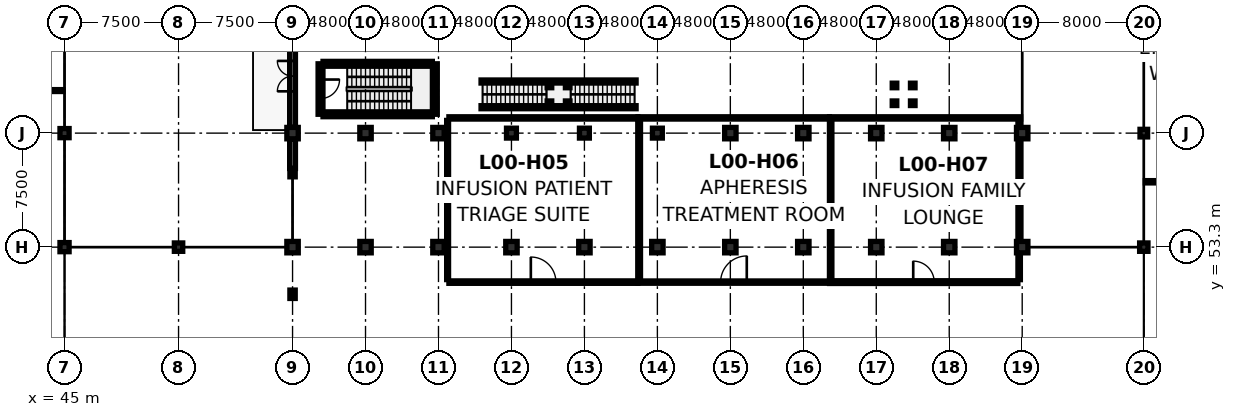
"""IFC4 building model, lengths in metres.
Left out: names, types, materials, properties, quantities, classifications, styles, units other than length and angle.
Written with IfcOpenShell. Run it as: python <this file> out.ifc"""

import sys

from ifc_helpers import new_model, si_unit, direction, frame, frame_2d, origin, origin_2d, place, context, subcontext, project, spatial, rectangle, circle, i_section, extrude, element, fill, save


model = new_model("IFC4")
c1 = context("Model", 3, precision=1e-05, world=origin(), true_north=direction((0.0, 1.0)))
c2 = subcontext(c1, "Body", "Model", "MODEL_VIEW")
j1 = project(units=[si_unit("LENGTHUNIT", "METRE"), si_unit("PLANEANGLEUNIT", "RADIAN")], contexts=[c1])
p1 = place(None, origin())
s1 = spatial("IfcSite", under=j1, at=p1, CompositionType="ELEMENT")
p2 = place(p1, origin())
s2 = spatial("IfcBuilding", under=s1, at=p2, CompositionType="ELEMENT")
p3 = place(p2, origin())
s3 = spatial("IfcBuildingStorey", under=s2, at=p3, CompositionType="ELEMENT", Elevation=0.0)
for number, where, z_axis, x_axis in (
    (1, (45.0, 53.3, 0.0), (0.0, 0.0, 1.0), (1.0, 0.0, 0.0)),
    (2, (45.0, 60.8, 0.0), (0.0, 0.0, 1.0), (1.0, 0.0, 0.0)),
):
    element("IfcColumn", number, at=place(p3, frame(where, z_axis=z_axis, x_axis=x_axis)), inside=s3, PredefinedType="COLUMN", context=c2, shape_type="SweptSolid", body=[
        extrude(rectangle(XDim=0.6, YDim=0.6, at=origin_2d()), origin(), (0.0, 0.0, 1.0), 4.7),
    ])
p4 = place(p3, frame((52.5, 53.3, 0.0), z_axis=(0.0, 0.0, 1.0), x_axis=(1.0, 0.0, 0.0)))
e3 = element("IfcColumn", 3, at=p4, inside=s3, PredefinedType="COLUMN", context=c2, shape_type="SweptSolid", body=[
    extrude(rectangle(XDim=0.55, YDim=0.55, at=origin_2d()), origin(), (0.0, 0.0, 1.0), 4.7),
])
for number, where, z_axis, x_axis in (
    (4, (60.0, 53.3, 0.0), (0.0, 0.0, 1.0), (1.0, 0.0, 0.0)),
    (5, (60.0, 60.8, 0.0), (0.0, 0.0, 1.0), (1.0, 0.0, 0.0)),
    (6, (64.8, 53.3, 0.0), (0.0, 0.0, 1.0), (1.0, 0.0, 0.0)),
    (7, (64.8, 60.8, 0.0), (0.0, 0.0, 1.0), (1.0, 0.0, 0.0)),
    (8, (69.6, 53.3, 0.0), (0.0, 0.0, 1.0), (1.0, 0.0, 0.0)),
    (9, (69.6, 60.8, 0.0), (0.0, 0.0, 1.0), (1.0, 0.0, 0.0)),
    (10, (74.4, 53.3, 0.0), (0.0, 0.0, 1.0), (1.0, 0.0, 0.0)),
    (11, (79.2, 53.3, 0.0), (0.0, 0.0, 1.0), (1.0, 0.0, 0.0)),
    (12, (84.0, 53.3, 0.0), (0.0, 0.0, 1.0), (1.0, 0.0, 0.0)),
    (13, (88.8, 53.3, 0.0), (0.0, 0.0, 1.0), (1.0, 0.0, 0.0)),
    (14, (88.8, 60.8, 0.0), (0.0, 0.0, 1.0), (1.0, 0.0, 0.0)),
    (15, (93.6, 53.3, 0.0), (0.0, 0.0, 1.0), (1.0, 0.0, 0.0)),
    (16, (93.6, 60.8, 0.0), (0.0, 0.0, 1.0), (1.0, 0.0, 0.0)),
    (17, (98.4, 53.3, 0.0), (0.0, 0.0, 1.0), (1.0, 0.0, 0.0)),
    (18, (98.4, 60.8, 0.0), (0.0, 0.0, 1.0), (1.0, 0.0, 0.0)),
    (19, (103.2, 53.3, 0.0), (0.0, 0.0, 1.0), (1.0, 0.0, 0.0)),
    (20, (103.2, 60.8, 0.0), (0.0, 0.0, 1.0), (1.0, 0.0, 0.0)),
    (21, (108.0, 53.3, 0.0), (0.0, 0.0, 1.0), (1.0, 0.0, 0.0)),
    (22, (108.0, 60.8, 0.0), (0.0, 0.0, 1.0), (1.0, 0.0, 0.0)),
):
    element("IfcColumn", number, at=place(p3, frame(where, z_axis=z_axis, x_axis=x_axis)), inside=s3, PredefinedType="COLUMN", context=c2, shape_type="SweptSolid", body=[
        extrude(circle(Radius=0.375, at=origin_2d()), origin(), (0.0, 0.0, 1.0), 4.7),
    ])
p5 = place(p3, frame((116.0, 53.3, 0.0), z_axis=(0.0, 0.0, 1.0), x_axis=(1.0, 0.0, 0.0)))
e23 = element("IfcColumn", 23, at=p5, inside=s3, PredefinedType="COLUMN", context=c2, shape_type="SweptSolid", body=[
    extrude(rectangle(XDim=0.55, YDim=0.55, at=origin_2d()), origin(), (0.0, 0.0, 1.0), 4.7),
])
p6 = place(p3, frame((116.0, 60.8, 0.0), z_axis=(0.0, 0.0, 1.0), x_axis=(1.0, 0.0, 0.0)))
e24 = element("IfcColumn", 24, at=p6, inside=s3, PredefinedType="COLUMN", context=c2, shape_type="SweptSolid", body=[
    extrude(rectangle(XDim=0.5, YDim=0.5, at=origin_2d()), origin(), (0.0, 0.0, 1.0), 4.704),
])
for number, where, z_axis, x_axis in (
    (25, (60.0, 50.2, 0.0), (0.0, 0.0, 1.0), (1.0, 0.0, 0.0)),
    (26, (60.0, 58.2, 0.0), (0.0, 0.0, 1.0), (1.0, 0.0, 0.0)),
):
    element("IfcColumn", number, at=place(p3, frame(where, z_axis=z_axis, x_axis=x_axis)), inside=s3, PredefinedType="PILASTER", context=c2, shape_type="SweptSolid", body=[
        extrude(rectangle(XDim=0.35, YDim=0.55, at=origin_2d()), origin(), (0.0, 0.0, 1.0), 4.7),
    ])
for number, where, z_axis, x_axis in (
    (27, (74.4, 60.8, 0.0), (0.0, 0.0, 1.0), (1.0, 0.0, 0.0)),
    (28, (79.2, 60.8, 0.0), (0.0, 0.0, 1.0), (1.0, 0.0, 0.0)),
    (29, (84.0, 60.8, 0.0), (0.0, 0.0, 1.0), (1.0, 0.0, 0.0)),
):
    element("IfcColumn", number, at=place(p3, frame(where, z_axis=z_axis, x_axis=x_axis)), inside=s3, PredefinedType="COLUMN", context=c2, shape_type="SweptSolid", body=[
        extrude(circle(Radius=0.325, at=origin_2d()), origin(), (0.0, 0.0, 1.0), 4.7),
    ])
p7 = place(p3, frame((60.0, 58.475, 0.0), z_axis=(0.0, 0.0, 1.0), x_axis=(0.0, 1.0, 0.0)))
e30 = element("IfcWall", 30, at=p7, inside=s3, PredefinedType="SOLIDWALL", context=c2, shape_type="SweptSolid", body=[
    extrude(rectangle(XDim=1.95, YDim=0.38, at=frame_2d((0.975, 0.0))), origin(), (0.0, 0.0, 1.0), 4.035),
])
p8 = place(p3, frame((60.0, 61.175, 0.0), z_axis=(0.0, 0.0, 1.0), x_axis=(0.0, 1.0, 0.0)))
e31 = element("IfcWall", 31, at=p8, inside=s3, PredefinedType="SOLIDWALL", context=c2, shape_type="SweptSolid", body=[
    extrude(rectangle(XDim=6.75, YDim=0.38, at=frame_2d((3.375, 0.0))), origin(), (0.0, 0.0, 1.0), 4.035),
])
p9 = place(p8, frame((2.375, 0.0, 0.0)))
e32 = element("IfcOpeningElement", 32, at=p9, cuts=e31, PredefinedType="OPENING", context=c2, shape_type="SweptSolid", body=[
    extrude(rectangle(XDim=2.0, YDim=2.35, at=frame_2d((1.0, 1.175))), frame((0.0, 0.202, 0.0), z_axis=(0.0, -1.0, 0.0), x_axis=(1.0, 0.0, 0.0)), (0.0, 0.0, 1.0), 0.404),
])
p10 = place(p3, frame((62.005, 62.04, 0.0), z_axis=(0.0, 0.0, 1.0), x_axis=(1.0, 0.0, 0.0)))
e33 = element("IfcWall", 33, at=p10, inside=s3, PredefinedType="SHEAR", context=c2, shape_type="SweptSolid", body=[
    extrude(rectangle(XDim=7.19, YDim=0.32, at=frame_2d((3.595, 0.0))), origin(), (0.0, 0.0, 1.0), 4.7),
])
p11 = place(p3, frame((69.36, 62.04, 0.0), z_axis=(0.0, 0.0, 1.0), x_axis=(0.0, 1.0, 0.0)))
e34 = element("IfcWall", 34, at=p11, inside=s3, PredefinedType="SHEAR", context=c2, shape_type="SweptSolid", body=[
    extrude(rectangle(XDim=3.32, YDim=0.32, at=frame_2d((1.66, 0.0))), origin(), (0.0, 0.0, 1.0), 4.7),
])
p12 = place(p3, frame((69.195, 65.36, 0.0), z_axis=(0.0, 0.0, 1.0), x_axis=(-1.0, 0.0, 0.0)))
e35 = element("IfcWall", 35, at=p12, inside=s3, PredefinedType="SHEAR", context=c2, shape_type="SweptSolid", body=[
    extrude(rectangle(XDim=7.19, YDim=0.32, at=frame_2d((3.595, 0.0))), origin(), (0.0, 0.0, 1.0), 4.7),
])
p13 = place(p3, frame((61.84, 65.36, 0.0), z_axis=(0.0, 0.0, 1.0), x_axis=(0.0, -1.0, 0.0)))
e36 = element("IfcWall", 36, at=p13, inside=s3, PredefinedType="SHEAR", context=c2, shape_type="SweptSolid", body=[
    extrude(rectangle(XDim=3.32, YDim=0.32, at=frame_2d((1.66, 0.0))), origin(), (0.0, 0.0, 1.0), 4.7),
])
p14 = place(p13, frame((1.035, 0.0, 0.0)))
e37 = element("IfcOpeningElement", 37, at=p14, cuts=e36, PredefinedType="OPENING", context=c2, shape_type="SweptSolid", body=[
    extrude(rectangle(XDim=1.25, YDim=2.2, at=frame_2d((0.625, 1.1))), frame((0.0, 0.172, 0.0), z_axis=(0.0, -1.0, 0.0), x_axis=(1.0, 0.0, 0.0)), (0.0, 0.0, 1.0), 0.344),
])
for number, where, z_axis, x_axis in (
    (38, (72.4, 62.505, 0.0), (0.0, 0.0, 1.0), (1.0, 0.0, 0.0)),
    (39, (72.4, 64.195, 0.0), (0.0, 0.0, 1.0), (1.0, 0.0, 0.0)),
):
    element("IfcWall", number, at=place(p3, frame(where, z_axis=z_axis, x_axis=x_axis)), inside=s3, PredefinedType="PARTITIONING", context=c2, shape_type="SweptSolid", body=[
        extrude(rectangle(XDim=10.2, YDim=0.2, at=frame_2d((5.1, 0.0))), origin(), (0.0, 0.0, 1.0), 2.3),
    ])
for number, where, z_axis, x_axis in (
    (40, (76.9, 62.765, 0.0), (0.0, 0.0, 1.0), (1.0, 0.0, 0.0)),
    (41, (78.1, 62.765, 0.0), (0.0, 0.0, 1.0), (1.0, 0.0, 0.0)),
    (42, (78.1, 63.935, 0.0), (0.0, 0.0, 1.0), (1.0, 0.0, 0.0)),
    (43, (76.9, 63.935, 0.0), (0.0, 0.0, 1.0), (1.0, 0.0, 0.0)),
):
    element("IfcColumn", number, at=place(p3, frame(where, z_axis=z_axis, x_axis=x_axis)), inside=s3, PredefinedType="COLUMN", context=c2, shape_type="SweptSolid", body=[
        extrude(i_section(OverallWidth=0.3, OverallDepth=0.3, WebThickness=0.011, FlangeThickness=0.019, FilletRadius=0.027, at=origin_2d()), origin(), (0.0, 0.0, 1.0), 2.3),
    ])
for number, where, z_axis, x_axis in (
    (44, (99.6, 62.765, 0.0), (0.0, 0.0, 1.0), (1.0, 0.0, 0.0)),
    (45, (100.8, 62.765, 0.0), (0.0, 0.0, 1.0), (1.0, 0.0, 0.0)),
    (46, (100.8, 63.935, 0.0), (0.0, 0.0, 1.0), (1.0, 0.0, 0.0)),
    (47, (99.6, 63.935, 0.0), (0.0, 0.0, 1.0), (1.0, 0.0, 0.0)),
):
    element("IfcColumn", number, at=place(p3, frame(where, z_axis=z_axis, x_axis=x_axis)), inside=s3, PredefinedType="COLUMN", context=c2, shape_type="SweptSolid", body=[
        extrude(i_section(OverallWidth=0.3, OverallDepth=0.3, WebThickness=0.011, FlangeThickness=0.019, FilletRadius=0.027, at=origin_2d()), origin(), (0.0, 0.0, 1.0), 4.7),
    ])
p15 = place(p3, frame((29.927, 63.6, 0.0), z_axis=(0.0, 0.0, 1.0), x_axis=(1.0, 0.0, 0.0)))
e48 = element("IfcWall", 48, at=p15, inside=s3, PredefinedType="PARTITIONING", context=c2, shape_type="SweptSolid", body=[
    extrude(rectangle(XDim=14.971, YDim=0.125, at=frame_2d((7.485, 0.0))), origin(), (0.0, 0.0, 1.0), 3.985),
])
p16 = place(p15, frame((6.926, 0.0, 0.0)))
e49 = element("IfcOpeningElement", 49, at=p16, cuts=e48, PredefinedType="OPENING", context=c2, shape_type="SweptSolid", body=[
    extrude(rectangle(XDim=1.12, YDim=2.2, at=frame_2d((0.56, 1.1))), frame((0.0, 0.074, 0.0), z_axis=(0.0, -1.0, 0.0), x_axis=(1.0, 0.0, 0.0)), (0.0, 0.0, 1.0), 0.149),
])
p17 = place(p3, frame((70.285, 51.0, 0.0), z_axis=(0.0, 0.0, 1.0), x_axis=(1.0, 0.0, 0.0)))
e50 = element("IfcWall", 50, at=p17, inside=s3, PredefinedType="PARTITIONING", context=c2, shape_type="SweptSolid", body=[
    extrude(rectangle(XDim=12.43, YDim=0.16, at=frame_2d((6.215, 0.0))), origin(), (0.0, 0.0, 1.0), 3.985),
])
p18 = place(p17, frame((5.39, 0.0, 0.0)))
e51 = element("IfcOpeningElement", 51, at=p18, cuts=e50, PredefinedType="OPENING", context=c2, shape_type="SweptSolid", body=[
    extrude(rectangle(XDim=1.65, YDim=2.32, at=frame_2d((0.825, 1.16))), frame((0.0, 0.092, 0.0), z_axis=(0.0, -1.0, 0.0), x_axis=(1.0, 0.0, 0.0)), (0.0, 0.0, 1.0), 0.184),
])
p19 = place(p3, frame((82.727, 51.0, 0.0), z_axis=(0.0, 0.0, 1.0), x_axis=(1.0, 0.0, 0.0)))
e52 = element("IfcWall", 52, at=p19, inside=s3, PredefinedType="PARTITIONING", context=c2, shape_type="SweptSolid", body=[
    extrude(rectangle(XDim=12.588, YDim=0.15, at=frame_2d((6.294, 0.0))), origin(), (0.0, 0.0, 1.0), 3.985),
])
p20 = place(p19, frame((5.434, 0.0, 0.0)))
e53 = element("IfcOpeningElement", 53, at=p20, cuts=e52, PredefinedType="OPENING", context=c2, shape_type="SweptSolid", body=[
    extrude(rectangle(XDim=1.72, YDim=2.34, at=frame_2d((0.86, 1.17))), frame((0.0, 0.087, 0.0), z_axis=(0.0, -1.0, 0.0), x_axis=(1.0, 0.0, 0.0)), (0.0, 0.0, 1.0), 0.174),
])
p21 = place(p3, frame((95.327, 51.0, 0.0), z_axis=(0.0, 0.0, 1.0), x_axis=(1.0, 0.0, 0.0)))
e54 = element("IfcWall", 54, at=p21, inside=s3, PredefinedType="PARTITIONING", context=c2, shape_type="SweptSolid", body=[
    extrude(rectangle(XDim=12.388, YDim=0.18, at=frame_2d((6.194, 0.0))), origin(), (0.0, 0.0, 1.0), 3.985),
])
p22 = place(p21, frame((5.504, 0.0, 0.0)))
e55 = element("IfcOpeningElement", 55, at=p22, cuts=e54, PredefinedType="OPENING", context=c2, shape_type="SweptSolid", body=[
    extrude(rectangle(XDim=1.38, YDim=2.3, at=frame_2d((0.69, 1.15))), frame((0.0, 0.102, 0.0), z_axis=(0.0, -1.0, 0.0), x_axis=(1.0, 0.0, 0.0)), (0.0, 0.0, 1.0), 0.204),
])
p23 = place(p3, frame((116.102, 57.6, 0.0), z_axis=(0.0, 0.0, 1.0), x_axis=(1.0, 0.0, 0.0)))
e56 = element("IfcWall", 56, at=p23, inside=s3, PredefinedType="PARTITIONING", context=c2, shape_type="SweptSolid", body=[
    extrude(rectangle(XDim=7.813, YDim=0.15, at=frame_2d((3.906, 0.0))), origin(), (0.0, 0.0, 1.0), 4.67),
])
p24 = place(p23, frame((3.187, 0.0, 0.0)))
e57 = element("IfcOpeningElement", 57, at=p24, cuts=e56, PredefinedType="OPENING", context=c2, shape_type="SweptSolid", body=[
    extrude(rectangle(XDim=1.44, YDim=2.32, at=frame_2d((0.72, 1.16))), frame((0.0, 0.087, 0.0), z_axis=(0.0, -1.0, 0.0), x_axis=(1.0, 0.0, 0.0)), (0.0, 0.0, 1.0), 0.174),
])
p25 = place(p3, frame((70.285, 61.8, 0.0), z_axis=(0.0, 0.0, 1.0), x_axis=(1.0, 0.0, 0.0)))
e58 = element("IfcWall", 58, at=p25, inside=s3, PredefinedType="PARTITIONING", context=c2, shape_type="SweptSolid", body=[
    extrude(rectangle(XDim=12.43, YDim=0.15, at=frame_2d((6.215, 0.0))), origin(), (0.0, 0.0, 1.0), 4.7),
])
p26 = place(p3, frame((82.727, 61.8, 0.0), z_axis=(0.0, 0.0, 1.0), x_axis=(1.0, 0.0, 0.0)))
e59 = element("IfcWall", 59, at=p26, inside=s3, PredefinedType="PARTITIONING", context=c2, shape_type="SweptSolid", body=[
    extrude(rectangle(XDim=12.588, YDim=0.15, at=frame_2d((6.294, 0.0))), origin(), (0.0, 0.0, 1.0), 3.985),
])
p27 = place(p3, frame((95.327, 61.8, 0.0), z_axis=(0.0, 0.0, 1.0), x_axis=(1.0, 0.0, 0.0)))
e60 = element("IfcWall", 60, at=p27, inside=s3, PredefinedType="PARTITIONING", context=c2, shape_type="SweptSolid", body=[
    extrude(rectangle(XDim=12.571, YDim=0.15, at=frame_2d((6.286, 0.0))), origin(), (0.0, 0.0, 1.0), 4.035),
])
p28 = place(p3, frame((70.2, 51.165, 0.0), z_axis=(0.0, 0.0, 1.0), x_axis=(0.0, 1.0, 0.0)))
e61 = element("IfcWall", 61, at=p28, inside=s3, PredefinedType="PARTITIONING", context=c2, shape_type="SweptSolid", body=[
    extrude(rectangle(XDim=10.47, YDim=0.125, at=frame_2d((5.235, 0.0))), origin(), (0.0, 0.0, 1.0), 4.085),
])
p29 = place(p3, frame((82.8, 51.087, 0.0), z_axis=(0.0, 0.0, 1.0), x_axis=(0.0, 1.0, 0.0)))
e62 = element("IfcWall", 62, at=p29, inside=s3, PredefinedType="PARTITIONING", context=c2, shape_type="SweptSolid", body=[
    extrude(rectangle(XDim=10.626, YDim=0.18, at=frame_2d((5.313, 0.0))), origin(), (0.0, 0.0, 1.0), 4.035),
])
p30 = place(p3, frame((95.4, 51.102, 0.0), z_axis=(0.0, 0.0, 1.0), x_axis=(0.0, 1.0, 0.0)))
e63 = element("IfcWall", 63, at=p30, inside=s3, PredefinedType="PARTITIONING", context=c2, shape_type="SweptSolid", body=[
    extrude(rectangle(XDim=10.611, YDim=0.16, at=frame_2d((5.305, 0.0))), origin(), (0.0, 0.0, 1.0), 4.085),
])
p31 = place(p3, frame((107.8, 51.165, 0.0), z_axis=(0.0, 0.0, 1.0), x_axis=(0.0, 1.0, 0.0)))
e64 = element("IfcWall", 64, at=p31, inside=s3, PredefinedType="PARTITIONING", context=c2, shape_type="SweptSolid", body=[
    extrude(rectangle(XDim=10.548, YDim=0.16, at=frame_2d((5.274, 0.0))), origin(), (0.0, 0.0, 1.0), 3.985),
])
p32 = place(p9, origin())
e65 = element("IfcDoor", 65, at=p32, inside=s3, OperationType="DOUBLE_DOOR_SINGLE_SWING", PredefinedType="DOOR", context=c2, shape_type="SweptSolid", body=[
    extrude(rectangle(XDim=2.0, YDim=2.35, at=frame_2d((1.0, 1.175))), frame((0.0, 0.025, 0.0), z_axis=(0.0, -1.0, 0.0), x_axis=(1.0, 0.0, 0.0)), (0.0, 0.0, 1.0), 0.05),
])
fill(e32, e65)
p33 = place(p14, origin())
e66 = element("IfcDoor", 66, at=p33, inside=s3, OperationType="SINGLE_SWING_LEFT", PredefinedType="DOOR", context=c2, shape_type="SweptSolid", body=[
    extrude(rectangle(XDim=1.25, YDim=2.2, at=frame_2d((0.625, 1.1))), frame((0.0, 0.025, 0.0), z_axis=(0.0, -1.0, 0.0), x_axis=(1.0, 0.0, 0.0)), (0.0, 0.0, 1.0), 0.05),
])
fill(e37, e66)
p34 = place(p18, origin())
e67 = element("IfcDoor", 67, at=p34, inside=s3, OperationType="SINGLE_SWING_LEFT", PredefinedType="DOOR", context=c2, shape_type="SweptSolid", body=[
    extrude(rectangle(XDim=1.65, YDim=2.32, at=frame_2d((0.825, 1.16))), frame((0.0, 0.025, 0.0), z_axis=(0.0, -1.0, 0.0), x_axis=(1.0, 0.0, 0.0)), (0.0, 0.0, 1.0), 0.05),
])
fill(e51, e67)
p35 = place(p20, origin())
e68 = element("IfcDoor", 68, at=p35, inside=s3, OperationType="SINGLE_SWING_RIGHT", PredefinedType="DOOR", context=c2, shape_type="SweptSolid", body=[
    extrude(rectangle(XDim=1.72, YDim=2.34, at=frame_2d((0.86, 1.17))), frame((0.0, 0.025, 0.0), z_axis=(0.0, -1.0, 0.0), x_axis=(1.0, 0.0, 0.0)), (0.0, 0.0, 1.0), 0.05),
])
fill(e53, e68)
p36 = place(p22, origin())
e69 = element("IfcDoor", 69, at=p36, inside=s3, OperationType="SINGLE_SWING_LEFT", PredefinedType="DOOR", context=c2, shape_type="SweptSolid", body=[
    extrude(rectangle(XDim=1.38, YDim=2.3, at=frame_2d((0.69, 1.15))), frame((0.0, 0.025, 0.0), z_axis=(0.0, -1.0, 0.0), x_axis=(1.0, 0.0, 0.0)), (0.0, 0.0, 1.0), 0.05),
])
fill(e55, e69)
save(model, sys.argv[1])
